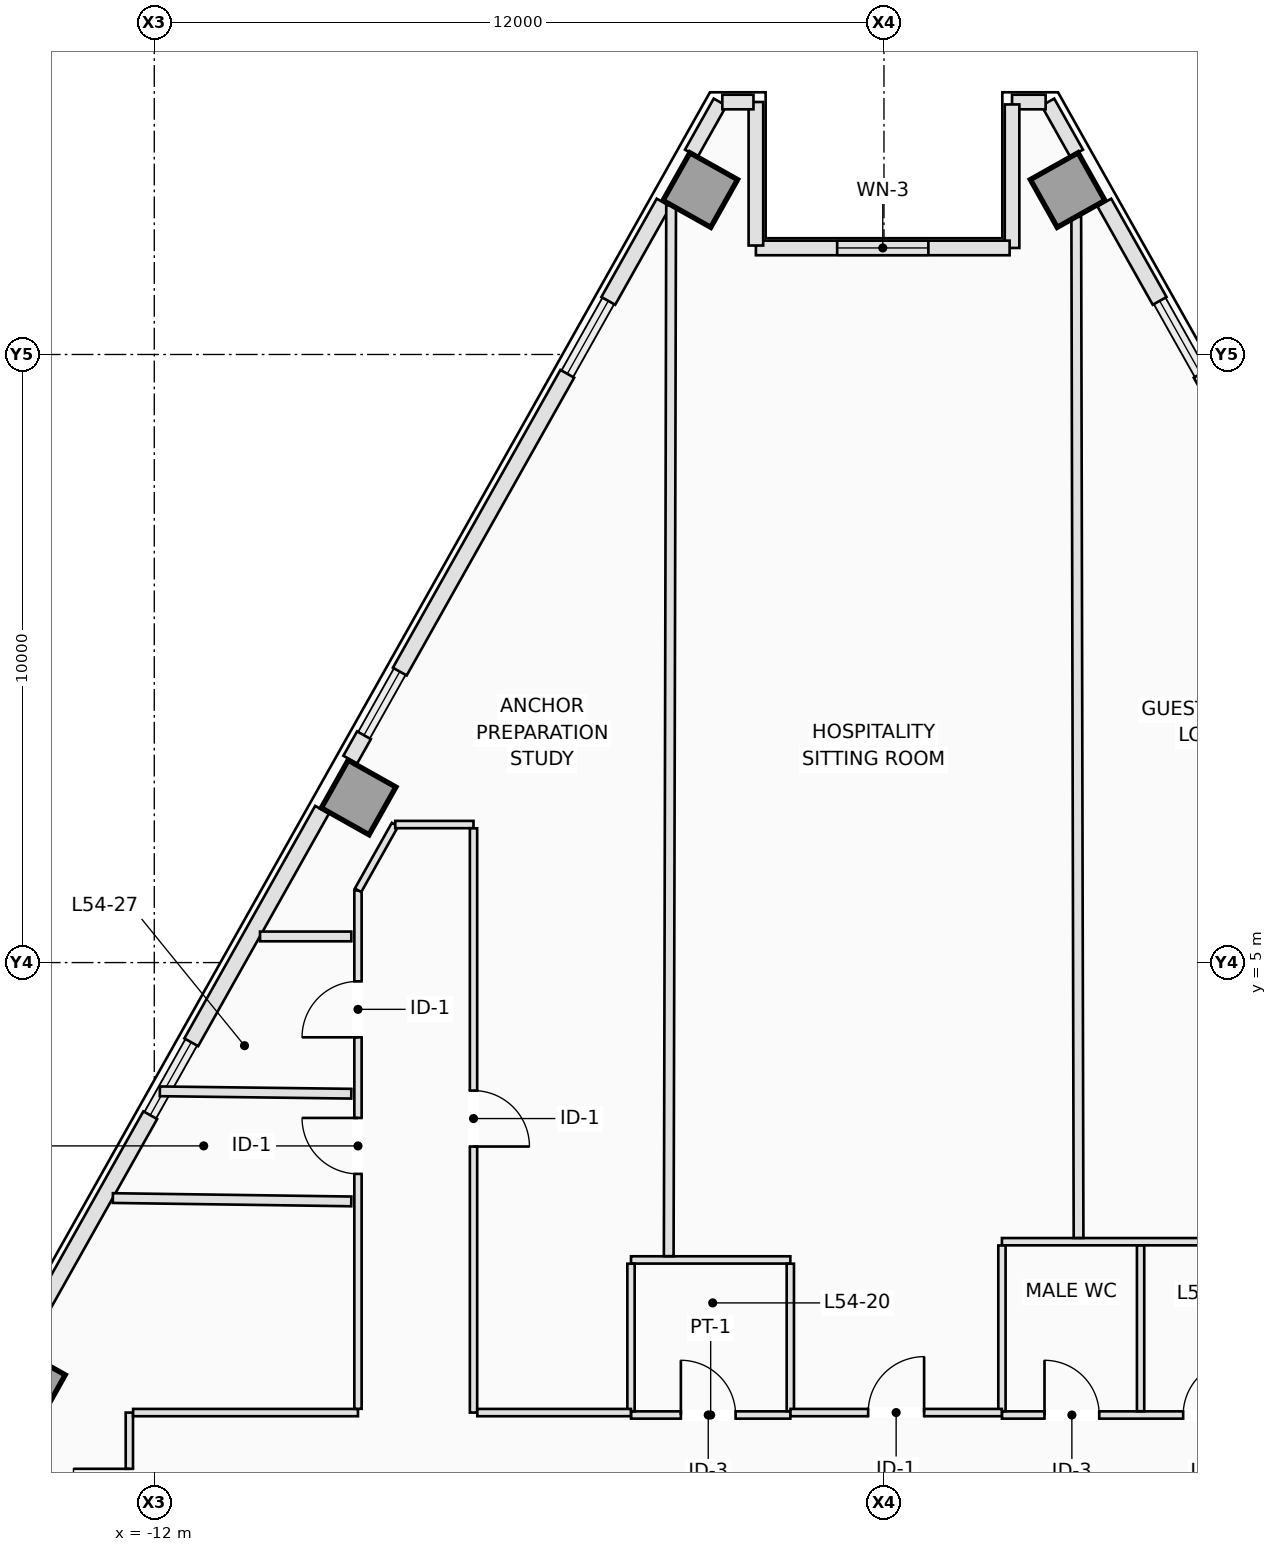
"""IFC4 building model, lengths in metres.
Left out: names, types, materials, properties, quantities, classifications, styles, units other than length and angle.
Written with IfcOpenShell. Run it as: python <this file> out.ifc"""

import sys

from ifc_helpers import new_model, si_unit, direction, frame, frame_2d, origin, origin_2d, place, context, subcontext, project, spatial, rectangle, extrude, element, fill, save


model = new_model("IFC4")
c1 = context("Model", 3, precision=1e-05, world=origin(), true_north=direction((0.0, 1.0)))
c2 = subcontext(c1, "Body", "Model", "MODEL_VIEW")
j1 = project(units=[si_unit("LENGTHUNIT", "METRE"), si_unit("PLANEANGLEUNIT", "RADIAN")], contexts=[c1])
p1 = place(None, origin())
s1 = spatial("IfcSite", under=j1, at=p1, CompositionType="ELEMENT")
p2 = place(p1, origin())
s2 = spatial("IfcBuilding", under=s1, at=p2, CompositionType="ELEMENT")
p3 = place(p2, frame((0.0, 0.0, 197.4)))
s3 = spatial("IfcBuildingStorey", under=s2, at=p3, CompositionType="ELEMENT", Elevation=197.4)
for number, where, z_axis, x_axis in (
    (1, (3.021, 17.704, 0.0), (0.0, 0.0, 1.0), (0.872, 0.49, 0.0)),
    (2, (-3.021, 17.704, 0.0), (0.0, 0.0, 1.0), (-0.872, 0.49, 0.0)),
    (3, (-8.64, 7.715, 0.0), (0.0, 0.0, 1.0), (-0.872, 0.49, 0.0)),
    (4, (-14.077, -1.952, 0.0), (0.0, 0.0, 1.0), (-0.872, 0.49, 0.0)),
):
    element("IfcColumn", number, at=place(p3, frame(where, z_axis=z_axis, x_axis=x_axis)), inside=s3, PredefinedType="COLUMN", context=c2, shape_type="SweptSolid", body=[
        extrude(rectangle(XDim=0.9, YDim=0.9, at=origin_2d()), origin(), (0.0, 0.0, 1.0), 3.5),
    ])
p4 = place(p3, frame((2.695, 19.149, 0.0), z_axis=(0.0, 0.0, 1.0), x_axis=(0.490345412687, -0.87152818443, 0.0)))
e5 = element("IfcWall", 5, at=p4, inside=s3, PredefinedType="STANDARD", context=c2, shape_type="SweptSolid", body=[
    extrude(rectangle(XDim=0.964, YDim=0.24, at=frame_2d((0.482, 0.0))), origin(), (0.0, 0.0, 1.0), 3.25),
])
p5 = place(p3, frame((3.624, 17.499, 0.0), z_axis=(0.0, 0.0, 1.0), x_axis=(0.490261239633, -0.871575537125, 0.0)))
e6 = element("IfcWall", 6, at=p5, inside=s3, PredefinedType="STANDARD", context=c2, shape_type="SweptSolid", body=[
    extrude(rectangle(XDim=1.855, YDim=0.26, at=frame_2d((0.928, 0.0))), origin(), (0.0, 0.0, 1.0), 3.25),
])
p6 = place(p3, frame((5.208, 14.682, 0.0), z_axis=(0.0, 0.0, 1.0), x_axis=(0.490240608828, -0.871587141631, 0.0)))
e7 = element("IfcWall", 7, at=p6, inside=s3, PredefinedType="STANDARD", context=c2, shape_type="SweptSolid", body=[
    extrude(rectangle(XDim=5.618, YDim=0.26, at=frame_2d((2.809, 0.0))), origin(), (0.0, 0.0, 1.0), 3.25),
])
p7 = place(p3, frame((-3.168, 18.309, 0.0), z_axis=(0.0, 0.0, 1.0), x_axis=(0.490345412687, 0.87152818443, 0.0)))
e8 = element("IfcWall", 8, at=p7, inside=s3, PredefinedType="STANDARD", context=c2, shape_type="SweptSolid", body=[
    extrude(rectangle(XDim=0.964, YDim=0.24, at=frame_2d((0.482, 0.0))), origin(), (0.0, 0.0, 1.0), 3.25),
])
p8 = place(p3, frame((-8.777, 8.337, 0.0), z_axis=(0.0, 0.0, 1.0), x_axis=(0.490412424957, 0.871490478116, 0.0)))
e9 = element("IfcWall", 9, at=p8, inside=s3, PredefinedType="STANDARD", context=c2, shape_type="SweptSolid", body=[
    extrude(rectangle(XDim=0.46, YDim=0.26, at=frame_2d((0.23, 0.0))), origin(), (0.0, 0.0, 1.0), 3.25),
])
p9 = place(p3, frame((-7.962, 9.785, 0.0), z_axis=(0.0, 0.0, 1.0), x_axis=(0.490240608828, 0.871587141631, 0.0)))
e10 = element("IfcWall", 10, at=p9, inside=s3, PredefinedType="STANDARD", context=c2, shape_type="SweptSolid", body=[
    extrude(rectangle(XDim=5.618, YDim=0.26, at=frame_2d((2.809, 0.0))), origin(), (0.0, 0.0, 1.0), 3.25),
])
p10 = place(p3, frame((-4.533, 15.882, 0.0), z_axis=(0.0, 0.0, 1.0), x_axis=(0.490261239633, 0.871575537125, 0.0)))
e11 = element("IfcWall", 11, at=p10, inside=s3, PredefinedType="STANDARD", context=c2, shape_type="SweptSolid", body=[
    extrude(rectangle(XDim=1.855, YDim=0.26, at=frame_2d((0.928, 0.0))), origin(), (0.0, 0.0, 1.0), 3.25),
])
p11 = place(p3, frame((-14.217, -1.334, 0.0), z_axis=(0.0, 0.0, 1.0), x_axis=(0.490261239633, 0.871575537125, 0.0)))
e12 = element("IfcWall", 12, at=p11, inside=s3, PredefinedType="STANDARD", context=c2, shape_type="SweptSolid", body=[
    extrude(rectangle(XDim=4.388, YDim=0.26, at=frame_2d((2.194, 0.0))), origin(), (0.0, 0.0, 1.0), 3.25),
])
p12 = place(p3, frame((-11.392, 3.689, 0.0), z_axis=(0.0, 0.0, 1.0), x_axis=(0.490237464814, 0.871588910033, 0.0)))
e13 = element("IfcWall", 13, at=p12, inside=s3, PredefinedType="STANDARD", context=c2, shape_type="SweptSolid", body=[
    extrude(rectangle(XDim=4.388, YDim=0.26, at=frame_2d((2.194, 0.0))), origin(), (0.0, 0.0, 1.0), 3.25),
])
p13 = place(p3, frame((2.658, 19.152, 0.0), z_axis=(0.0, 0.0, 1.0), x_axis=(-1.0, 0.0, 0.0)))
e14 = element("IfcWall", 14, at=p13, inside=s3, PredefinedType="STANDARD", context=c2, shape_type="SweptSolid", body=[
    extrude(rectangle(XDim=0.552, YDim=0.24, at=frame_2d((0.276, 0.0))), origin(), (0.0, 0.0, 1.0), 3.25),
])
p14 = place(p3, frame((2.106, 19.112, 0.0), z_axis=(0.0, 0.0, 1.0), x_axis=(0.0, -1.0, 0.0)))
e15 = element("IfcWall", 15, at=p14, inside=s3, PredefinedType="STANDARD", context=c2, shape_type="SweptSolid", body=[
    extrude(rectangle(XDim=2.36, YDim=0.24, at=frame_2d((1.18, 0.0))), origin(), (0.0, 0.0, 1.0), 3.25),
])
p15 = place(p3, frame((2.066, 16.752, 0.0), z_axis=(0.0, 0.0, 1.0), x_axis=(-1.0, 0.0, 0.0)))
e16 = element("IfcWall", 16, at=p15, inside=s3, PredefinedType="STANDARD", context=c2, shape_type="SweptSolid", body=[
    extrude(rectangle(XDim=4.172, YDim=0.24, at=frame_2d((2.086, 0.0))), origin(), (0.0, 0.0, 1.0), 3.25),
])
p16 = place(p15, frame((1.336, 0.0, 0.9)))
e17 = element("IfcOpeningElement", 17, at=p16, cuts=e16, PredefinedType="OPENING", context=c2, shape_type="SweptSolid", body=[
    extrude(rectangle(XDim=1.5, YDim=1.95, at=frame_2d((0.75, 0.975))), frame((0.0, 0.13, 0.0), z_axis=(0.0, -1.0, 0.0), x_axis=(1.0, 0.0, 0.0)), (0.0, 0.0, 1.0), 0.26),
])
p17 = place(p3, frame((-2.106, 16.792, 0.0), z_axis=(0.0, 0.0, 1.0), x_axis=(0.0, 1.0, 0.0)))
e18 = element("IfcWall", 18, at=p17, inside=s3, PredefinedType="STANDARD", context=c2, shape_type="SweptSolid", body=[
    extrude(rectangle(XDim=2.36, YDim=0.24, at=frame_2d((1.18, 0.0))), origin(), (0.0, 0.0, 1.0), 3.25),
])
p18 = place(p3, frame((-2.146, 19.152, 0.0), z_axis=(0.0, 0.0, 1.0), x_axis=(-1.0, 0.0, 0.0)))
e19 = element("IfcWall", 19, at=p18, inside=s3, PredefinedType="STANDARD", context=c2, shape_type="SweptSolid", body=[
    extrude(rectangle(XDim=0.512, YDim=0.24, at=frame_2d((0.256, 0.0))), origin(), (0.0, 0.0, 1.0), 3.25),
])
p19 = place(p3, frame((-4.16, -2.44, 0.0), z_axis=(0.0, 0.0, 1.0), x_axis=(1.0, 0.0, 0.0)))
e20 = element("IfcWall", 20, at=p19, inside=s3, PredefinedType="PARTITIONING", context=c2, shape_type="SweptSolid", body=[
    extrude(rectangle(XDim=2.62, YDim=0.12, at=frame_2d((1.31, 0.0))), origin(), (0.0, 0.0, 1.0), 2.943),
])
p20 = place(p19, frame((0.82, 0.0, 0.0)))
e21 = element("IfcOpeningElement", 21, at=p20, cuts=e20, PredefinedType="OPENING", context=c2, shape_type="SweptSolid", body=[
    extrude(rectangle(XDim=0.9, YDim=2.12, at=frame_2d((0.45, 1.06))), frame((0.0, 0.07, 0.0), z_axis=(0.0, -1.0, 0.0), x_axis=(1.0, 0.0, 0.0)), (0.0, 0.0, 1.0), 0.14),
])
p21 = place(p3, frame((-4.16, 0.11, 0.0), z_axis=(0.0, 0.0, 1.0), x_axis=(1.0, 0.0, 0.0)))
e22 = element("IfcWall", 22, at=p21, inside=s3, PredefinedType="PARTITIONING", context=c2, shape_type="SweptSolid", body=[
    extrude(rectangle(XDim=2.62, YDim=0.12, at=frame_2d((1.31, 0.0))), origin(), (0.0, 0.0, 1.0), 3.25),
])
for number, where, z_axis, x_axis in (
    (23, (-4.16, -2.378, 0.0), (0.0, 0.0, 1.0), (0.0, 1.0, 0.0)),
    (24, (-1.54, -2.378, 0.0), (0.0, 0.0, 1.0), (0.0, 1.0, 0.0)),
):
    element("IfcWall", number, at=place(p3, frame(where, z_axis=z_axis, x_axis=x_axis)), inside=s3, PredefinedType="PARTITIONING", context=c2, shape_type="SweptSolid", body=[
        extrude(rectangle(XDim=2.426, YDim=0.12, at=frame_2d((1.213, 0.0))), origin(), (0.0, 0.0, 1.0), 3.25),
    ])
p22 = place(p3, frame((1.94, -2.44, 0.0), z_axis=(0.0, 0.0, 1.0), x_axis=(1.0, 0.0, 0.0)))
e25 = element("IfcWall", 25, at=p22, inside=s3, PredefinedType="PARTITIONING", context=c2, shape_type="SweptSolid", body=[
    extrude(rectangle(XDim=4.57, YDim=0.12, at=frame_2d((2.285, 0.0))), origin(), (0.0, 0.0, 1.0), 2.943),
])
p23 = place(p22, frame((0.7, 0.0, 0.0)))
e26 = element("IfcOpeningElement", 26, at=p23, cuts=e25, PredefinedType="OPENING", context=c2, shape_type="SweptSolid", body=[
    extrude(rectangle(XDim=0.9, YDim=2.12, at=frame_2d((0.45, 1.06))), frame((0.0, 0.07, 0.0), z_axis=(0.0, -1.0, 0.0), x_axis=(1.0, 0.0, 0.0)), (0.0, 0.0, 1.0), 0.14),
])
p24 = place(p22, frame((2.98, 0.0, 0.0)))
e27 = element("IfcOpeningElement", 27, at=p24, cuts=e25, PredefinedType="OPENING", context=c2, shape_type="SweptSolid", body=[
    extrude(rectangle(XDim=0.9, YDim=2.12, at=frame_2d((0.45, 1.06))), frame((0.0, 0.07, 0.0), z_axis=(0.0, -1.0, 0.0), x_axis=(1.0, 0.0, 0.0)), (0.0, 0.0, 1.0), 0.14),
])
p25 = place(p3, frame((1.94, 0.41, 0.0), z_axis=(0.0, 0.0, 1.0), x_axis=(1.0, 0.0, 0.0)))
e28 = element("IfcWall", 28, at=p25, inside=s3, PredefinedType="PARTITIONING", context=c2, shape_type="SweptSolid", body=[
    extrude(rectangle(XDim=4.57, YDim=0.12, at=frame_2d((2.285, 0.0))), origin(), (0.0, 0.0, 1.0), 3.25),
])
for number, where, z_axis, x_axis in (
    (29, (1.94, -2.378, 0.0), (0.0, 0.0, 1.0), (0.0, 1.0, 0.0)),
    (30, (4.22, -2.378, 0.0), (0.0, 0.0, 1.0), (0.0, 1.0, 0.0)),
):
    element("IfcWall", number, at=place(p3, frame(where, z_axis=z_axis, x_axis=x_axis)), inside=s3, PredefinedType="PARTITIONING", context=c2, shape_type="SweptSolid", body=[
        extrude(rectangle(XDim=2.726, YDim=0.12, at=frame_2d((1.363, 0.0))), origin(), (0.0, 0.0, 1.0), 3.25),
    ])
p26 = place(p3, frame((-12.41, -5.073, 0.0), z_axis=(0.0, 0.0, 1.0), x_axis=(0.0, 1.0, 0.0)))
e31 = element("IfcWall", 31, at=p26, inside=s3, PredefinedType="PARTITIONING", context=c2, shape_type="SweptSolid", body=[
    extrude(rectangle(XDim=2.673, YDim=0.12, at=frame_2d((1.336, 0.0))), origin(), (0.0, 0.0, 1.0), 3.25),
])
p27 = place(p26, frame((0.828, 0.0, 0.0)))
e32 = element("IfcOpeningElement", 32, at=p27, cuts=e31, PredefinedType="OPENING", context=c2, shape_type="SweptSolid", body=[
    extrude(rectangle(XDim=0.92, YDim=2.12, at=frame_2d((0.46, 1.06))), frame((0.0, 0.07, 0.0), z_axis=(0.0, -1.0, 0.0), x_axis=(1.0, 0.0, 0.0)), (0.0, 0.0, 1.0), 0.14),
])
p28 = place(p3, frame((-12.348, -2.4, 0.0), z_axis=(0.0, 0.0, 1.0), x_axis=(1.0, 0.0, 0.0)))
e33 = element("IfcWall", 33, at=p28, inside=s3, PredefinedType="PARTITIONING", context=c2, shape_type="SweptSolid", body=[
    extrude(rectangle(XDim=3.698, YDim=0.12, at=frame_2d((1.849, 0.0))), origin(), (0.0, 0.0, 1.0), 3.25),
])
p29 = place(p3, frame((-8.65, -2.338, 0.0), z_axis=(0.0, 0.0, 1.0), x_axis=(0.0, 1.0, 0.0)))
e34 = element("IfcWall", 34, at=p29, inside=s3, PredefinedType="PARTITIONING", context=c2, shape_type="SweptSolid", body=[
    extrude(rectangle(XDim=8.525, YDim=0.12, at=frame_2d((4.262, 0.0))), origin(), (0.0, 0.0, 1.0), 3.25),
])
p30 = place(p29, frame((6.109, 0.0, 0.0)))
e35 = element("IfcOpeningElement", 35, at=p30, cuts=e34, PredefinedType="OPENING", context=c2, shape_type="SweptSolid", body=[
    extrude(rectangle(XDim=0.92, YDim=2.12, at=frame_2d((0.46, 1.06))), frame((0.0, 0.07, 0.0), z_axis=(0.0, -1.0, 0.0), x_axis=(1.0, 0.0, 0.0)), (0.0, 0.0, 1.0), 0.14),
])
p31 = place(p29, frame((3.863, 0.0, 0.0)))
e36 = element("IfcOpeningElement", 36, at=p31, cuts=e34, PredefinedType="OPENING", context=c2, shape_type="SweptSolid", body=[
    extrude(rectangle(XDim=0.92, YDim=2.12, at=frame_2d((0.46, 1.06))), frame((0.0, 0.07, 0.0), z_axis=(0.0, -1.0, 0.0), x_axis=(1.0, 0.0, 0.0)), (0.0, 0.0, 1.0), 0.14),
])
p32 = place(p3, frame((-8.649, 6.189, 0.0), z_axis=(0.0, 0.0, 1.0), x_axis=(0.490298618985, 0.871554510183, 0.0)))
e37 = element("IfcWall", 37, at=p32, inside=s3, PredefinedType="PARTITIONING", context=c2, shape_type="SweptSolid", body=[
    extrude(rectangle(XDim=1.24, YDim=0.12, at=frame_2d((0.62, 0.0))), origin(), (0.0, 0.0, 1.0), 3.25),
])
p33 = place(p3, frame((-8.037, 7.27, 0.0), z_axis=(0.0, 0.0, 1.0), x_axis=(1.0, 0.0, 0.0)))
e38 = element("IfcWall", 38, at=p33, inside=s3, PredefinedType="PARTITIONING", context=c2, shape_type="SweptSolid", body=[
    extrude(rectangle(XDim=1.287, YDim=0.12, at=frame_2d((0.643, 0.0))), origin(), (0.0, 0.0, 1.0), 3.25),
])
p34 = place(p3, frame((-6.75, 7.208, 0.0), z_axis=(0.0, 0.0, 1.0), x_axis=(0.0, -1.0, 0.0)))
e39 = element("IfcWall", 39, at=p34, inside=s3, PredefinedType="PARTITIONING", context=c2, shape_type="SweptSolid", body=[
    extrude(rectangle(XDim=9.608, YDim=0.12, at=frame_2d((4.804, 0.0))), origin(), (0.0, 0.0, 1.0), 3.25),
])
p35 = place(p34, frame((4.313, 0.0, 0.0)))
e40 = element("IfcOpeningElement", 40, at=p35, cuts=e39, PredefinedType="OPENING", context=c2, shape_type="SweptSolid", body=[
    extrude(rectangle(XDim=0.92, YDim=2.12, at=frame_2d((0.46, 1.06))), frame((0.0, 0.07, 0.0), z_axis=(0.0, -1.0, 0.0), x_axis=(1.0, 0.0, 0.0)), (0.0, 0.0, 1.0), 0.14),
])
p36 = place(p3, frame((-6.688, -2.4, 0.0), z_axis=(0.0, 0.0, 1.0), x_axis=(1.0, 0.0, 0.0)))
e41 = element("IfcWall", 41, at=p36, inside=s3, PredefinedType="PARTITIONING", context=c2, shape_type="SweptSolid", body=[
    extrude(rectangle(XDim=2.526, YDim=0.12, at=frame_2d((1.263, 0.0))), origin(), (0.0, 0.0, 1.0), 3.25),
])
p37 = place(p3, frame((-1.538, -2.4, 0.0), z_axis=(0.0, 0.0, 1.0), x_axis=(1.0, 0.0, 0.0)))
e42 = element("IfcWall", 42, at=p37, inside=s3, PredefinedType="PARTITIONING", context=c2, shape_type="SweptSolid", body=[
    extrude(rectangle(XDim=3.476, YDim=0.12, at=frame_2d((1.738, 0.0))), origin(), (0.0, 0.0, 1.0), 2.943),
])
p38 = place(p37, frame((1.278, 0.0, 0.0)))
e43 = element("IfcOpeningElement", 43, at=p38, cuts=e42, PredefinedType="OPENING", context=c2, shape_type="SweptSolid", body=[
    extrude(rectangle(XDim=0.92, YDim=2.12, at=frame_2d((0.46, 1.06))), frame((0.0, 0.07, 0.0), z_axis=(0.0, -1.0, 0.0), x_axis=(1.0, 0.0, 0.0)), (0.0, 0.0, 1.0), 0.14),
])
p39 = place(p3, frame((3.162, 17.265, 0.0), z_axis=(0.0, 0.0, 1.0), x_axis=(0.002238822058, -0.999997493835, 0.0)))
e44 = element("IfcWall", 44, at=p39, inside=s3, PredefinedType="PARTITIONING", context=c2, shape_type="SweptSolid", body=[
    extrude(rectangle(XDim=16.793, YDim=0.16, at=frame_2d((8.397, 0.0))), origin(), (0.0, 0.0, 1.0), 2.722),
])
p40 = place(p3, frame((-3.54, 0.172, 0.0), z_axis=(0.0, 0.0, 1.0), x_axis=(0.002274198148, 0.999997414008, 0.0)))
e45 = element("IfcWall", 45, at=p40, inside=s3, PredefinedType="PARTITIONING", context=c2, shape_type="SweptSolid", body=[
    extrude(rectangle(XDim=17.284, YDim=0.16, at=frame_2d((8.642, 0.0))), origin(), (0.0, 0.0, 1.0), 2.722),
])
p41 = place(p3, frame((-8.76, 5.43, 0.0), z_axis=(0.0, 0.0, 1.0), x_axis=(-1.0, 0.0, 0.0)))
e46 = element("IfcWall", 46, at=p41, inside=s3, PredefinedType="PARTITIONING", context=c2, shape_type="SweptSolid", body=[
    extrude(rectangle(XDim=1.501, YDim=0.16, at=frame_2d((0.75, 0.0))), origin(), (0.0, 0.0, 1.0), 3.25),
])
p42 = place(p3, frame((-8.76, 2.844, 0.0), z_axis=(0.0, 0.0, 1.0), x_axis=(-0.999923030771, 0.012406955015, 0.0)))
e47 = element("IfcWall", 47, at=p42, inside=s3, PredefinedType="PARTITIONING", context=c2, shape_type="SweptSolid", body=[
    extrude(rectangle(XDim=3.148, YDim=0.16, at=frame_2d((1.574, 0.0))), origin(), (0.0, 0.0, 1.0), 3.25),
])
p43 = place(p3, frame((-8.76, 1.073, 0.0), z_axis=(0.0, 0.0, 1.0), x_axis=(-0.999901887135, 0.014007715871, 0.0)))
e48 = element("IfcWall", 48, at=p43, inside=s3, PredefinedType="PARTITIONING", context=c2, shape_type="SweptSolid", body=[
    extrude(rectangle(XDim=3.922, YDim=0.16, at=frame_2d((1.961, 0.0))), origin(), (0.0, 0.0, 1.0), 3.25),
])
p44 = place(p16, origin())
e49 = element("IfcWindow", 49, at=p44, inside=s3, PartitioningType="SINGLE_PANEL", PredefinedType="WINDOW", context=c2, shape_type="SweptSolid", body=[
    extrude(rectangle(XDim=1.5, YDim=1.95, at=frame_2d((0.75, 0.975))), frame((0.0, 0.03, 0.0), z_axis=(0.0, -1.0, 0.0), x_axis=(1.0, 0.0, 0.0)), (0.0, 0.0, 1.0), 0.06),
])
fill(e17, e49)
p45 = place(p20, origin())
e50 = element("IfcDoor", 50, at=p45, inside=s3, OperationType="SINGLE_SWING_LEFT", PredefinedType="DOOR", context=c2, shape_type="SweptSolid", body=[
    extrude(rectangle(XDim=0.9, YDim=2.12, at=frame_2d((0.45, 1.06))), frame((0.0, 0.025, 0.0), z_axis=(0.0, -1.0, 0.0), x_axis=(1.0, 0.0, 0.0)), (0.0, 0.0, 1.0), 0.05),
])
fill(e21, e50)
p46 = place(p23, origin())
e51 = element("IfcDoor", 51, at=p46, inside=s3, OperationType="SINGLE_SWING_LEFT", PredefinedType="DOOR", context=c2, shape_type="SweptSolid", body=[
    extrude(rectangle(XDim=0.9, YDim=2.12, at=frame_2d((0.45, 1.06))), frame((0.0, 0.025, 0.0), z_axis=(0.0, -1.0, 0.0), x_axis=(1.0, 0.0, 0.0)), (0.0, 0.0, 1.0), 0.05),
])
fill(e26, e51)
p47 = place(p24, origin())
e52 = element("IfcDoor", 52, at=p47, inside=s3, OperationType="SINGLE_SWING_RIGHT", PredefinedType="DOOR", context=c2, shape_type="SweptSolid", body=[
    extrude(rectangle(XDim=0.9, YDim=2.12, at=frame_2d((0.45, 1.06))), frame((0.0, 0.025, 0.0), z_axis=(0.0, -1.0, 0.0), x_axis=(1.0, 0.0, 0.0)), (0.0, 0.0, 1.0), 0.05),
])
fill(e27, e52)
p48 = place(p38, origin())
e53 = element("IfcDoor", 53, at=p48, inside=s3, OperationType="SINGLE_SWING_RIGHT", PredefinedType="DOOR", context=c2, shape_type="SweptSolid", body=[
    extrude(rectangle(XDim=0.92, YDim=2.12, at=frame_2d((0.46, 1.06))), frame((0.0, 0.025, 0.0), z_axis=(0.0, -1.0, 0.0), x_axis=(1.0, 0.0, 0.0)), (0.0, 0.0, 1.0), 0.05),
])
fill(e43, e53)
p49 = place(p35, origin())
e54 = element("IfcDoor", 54, at=p49, inside=s3, OperationType="SINGLE_SWING_RIGHT", PredefinedType="DOOR", context=c2, shape_type="SweptSolid", body=[
    extrude(rectangle(XDim=0.92, YDim=2.12, at=frame_2d((0.46, 1.06))), frame((0.0, 0.025, 0.0), z_axis=(0.0, -1.0, 0.0), x_axis=(1.0, 0.0, 0.0)), (0.0, 0.0, 1.0), 0.05),
])
fill(e40, e54)
p50 = place(p30, origin())
e55 = element("IfcDoor", 55, at=p50, inside=s3, OperationType="SINGLE_SWING_LEFT", PredefinedType="DOOR", context=c2, shape_type="SweptSolid", body=[
    extrude(rectangle(XDim=0.92, YDim=2.12, at=frame_2d((0.46, 1.06))), frame((0.0, 0.025, 0.0), z_axis=(0.0, -1.0, 0.0), x_axis=(1.0, 0.0, 0.0)), (0.0, 0.0, 1.0), 0.05),
])
fill(e35, e55)
p51 = place(p31, origin())
e56 = element("IfcDoor", 56, at=p51, inside=s3, OperationType="SINGLE_SWING_RIGHT", PredefinedType="DOOR", context=c2, shape_type="SweptSolid", body=[
    extrude(rectangle(XDim=0.92, YDim=2.12, at=frame_2d((0.46, 1.06))), frame((0.0, 0.025, 0.0), z_axis=(0.0, -1.0, 0.0), x_axis=(1.0, 0.0, 0.0)), (0.0, 0.0, 1.0), 0.05),
])
fill(e36, e56)
p52 = place(p27, origin())
e57 = element("IfcDoor", 57, at=p52, inside=s3, OperationType="SINGLE_SWING_RIGHT", PredefinedType="DOOR", context=c2, shape_type="SweptSolid", body=[
    extrude(rectangle(XDim=0.92, YDim=2.12, at=frame_2d((0.46, 1.06))), frame((0.0, 0.025, 0.0), z_axis=(0.0, -1.0, 0.0), x_axis=(1.0, 0.0, 0.0)), (0.0, 0.0, 1.0), 0.05),
])
fill(e32, e57)
save(model, sys.argv[1])
